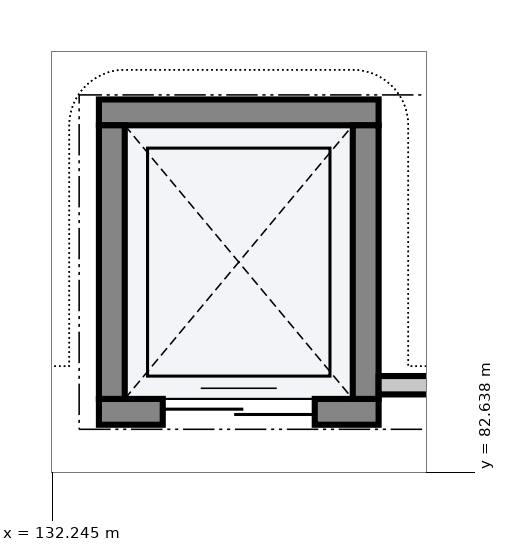
"""IFC4 building model, lengths in metres.
Left out: names, types, materials, properties, quantities, classifications, styles, units other than length and angle.
Written with IfcOpenShell. Run it as: python <this file> out.ifc"""

import sys

from ifc_helpers import new_model, si_unit, direction, frame, frame_2d, origin, place, context, subcontext, project, spatial, rectangle, extrude, element, fill, save


model = new_model("IFC4")
c1 = context("Model", 3, precision=1e-05, world=origin(), true_north=direction((0.0, 1.0)))
c2 = subcontext(c1, "Body", "Model", "MODEL_VIEW")
j1 = project(units=[si_unit("LENGTHUNIT", "METRE"), si_unit("PLANEANGLEUNIT", "RADIAN")], contexts=[c1])
p1 = place(None, origin())
s1 = spatial("IfcSite", under=j1, at=p1, CompositionType="ELEMENT")
p2 = place(p1, origin())
s2 = spatial("IfcBuilding", under=s1, at=p2, CompositionType="ELEMENT")
p3 = place(p2, frame((0.0, 0.0, -4.8)))
s3 = spatial("IfcBuildingStorey", under=s2, at=p3, CompositionType="ELEMENT", Elevation=-4.8)
p4 = place(p3, frame((132.86, 83.43, 0.0), z_axis=(0.0, 0.0, 1.0), x_axis=(1.0, 0.0, 0.0)))
e1 = element("IfcWall", 1, at=p4, inside=s3, PredefinedType="SHEAR", context=c2, shape_type="SweptSolid", body=[
    extrude(rectangle(XDim=3.68, YDim=0.34, at=frame_2d((1.84, 0.0))), origin(), (0.0, 0.0, 1.0), 4.5),
])
p5 = place(p4, frame((0.84, 0.0, 0.0)))
e2 = element("IfcOpeningElement", 2, at=p5, cuts=e1, PredefinedType="OPENING", context=c2, shape_type="SweptSolid", body=[
    extrude(rectangle(XDim=2.0, YDim=2.4, at=frame_2d((1.0, 1.2))), frame((0.0, 0.182, 0.0), z_axis=(0.0, -1.0, 0.0), x_axis=(1.0, 0.0, 0.0)), (0.0, 0.0, 1.0), 0.364),
])
p6 = place(p3, frame((132.86, 87.37, 0.0), z_axis=(0.0, 0.0, 1.0), x_axis=(1.0, 0.0, 0.0)))
e3 = element("IfcWall", 3, at=p6, inside=s3, PredefinedType="SHEAR", context=c2, shape_type="SweptSolid", body=[
    extrude(rectangle(XDim=3.68, YDim=0.34, at=frame_2d((1.84, 0.0))), origin(), (0.0, 0.0, 1.0), 4.5),
])
for number, where, z_axis, x_axis in (
    (4, (133.03, 83.6, 0.0), (0.0, 0.0, 1.0), (0.0, 1.0, 0.0)),
    (5, (136.37, 83.6, 0.0), (0.0, 0.0, 1.0), (0.0, 1.0, 0.0)),
):
    element("IfcWall", number, at=place(p3, frame(where, z_axis=z_axis, x_axis=x_axis)), inside=s3, PredefinedType="SHEAR", context=c2, shape_type="SweptSolid", body=[
        extrude(rectangle(XDim=3.6, YDim=0.34, at=frame_2d((1.8, 0.0))), origin(), (0.0, 0.0, 1.0), 4.5),
    ])
p7 = place(p3, frame((141.86, 83.78, 0.0), z_axis=(0.0, 0.0, 1.0), x_axis=(-1.0, 0.0, 0.0)))
e6 = element("IfcWall", 6, at=p7, inside=s3, PredefinedType="PARTITIONING", context=c2, shape_type="SweptSolid", body=[
    extrude(rectangle(XDim=5.32, YDim=0.242, at=frame_2d((2.66, 0.0))), origin(), (0.0, 0.0, 1.0), 3.44),
])
p8 = place(p5, origin())
e7 = element("IfcDoor", 7, at=p8, inside=s3, OperationType="DOUBLE_DOOR_SLIDING", PredefinedType="DOOR", context=c2, shape_type="SweptSolid", body=[
    extrude(rectangle(XDim=2.0, YDim=2.4, at=frame_2d((1.0, 1.2))), frame((0.0, 0.025, 0.0), z_axis=(0.0, -1.0, 0.0), x_axis=(1.0, 0.0, 0.0)), (0.0, 0.0, 1.0), 0.05),
])
fill(e2, e7)
save(model, sys.argv[1])
